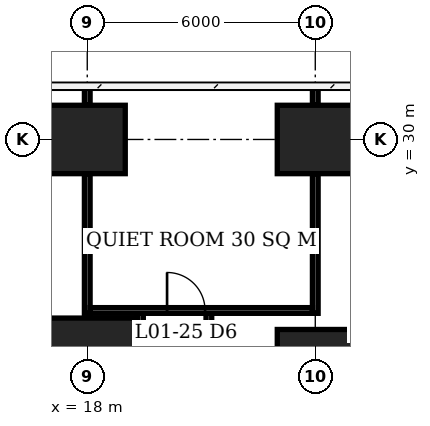
"""IFC4 building model, lengths in metres.
Left out: names, types, materials, properties, quantities, classifications, styles, units other than length and angle.
Written with IfcOpenShell. Run it as: python <this file> out.ifc"""

import sys

from ifc_helpers import new_model, si_unit, direction, frame, frame_2d, origin, origin_2d, place, context, subcontext, project, spatial, rectangle, extrude, element, fill, save


model = new_model("IFC4")
c1 = context("Model", 3, precision=1e-05, world=origin(), true_north=direction((0.0, 1.0)))
c2 = subcontext(c1, "Body", "Model", "MODEL_VIEW")
j1 = project(units=[si_unit("LENGTHUNIT", "METRE"), si_unit("PLANEANGLEUNIT", "RADIAN")], contexts=[c1])
p1 = place(None, origin())
s1 = spatial("IfcSite", under=j1, at=p1, CompositionType="ELEMENT")
p2 = place(p1, origin())
s2 = spatial("IfcBuilding", under=s1, at=p2, CompositionType="ELEMENT")
p3 = place(p2, frame((0.0, 0.0, 6.0)))
s3 = spatial("IfcBuildingStorey", under=s2, at=p3, CompositionType="ELEMENT", Elevation=6.0)
p4 = place(p3, frame((18.0, 24.0, 0.0), z_axis=(0.0, 0.0, 1.0), x_axis=(1.0, 0.0, 0.0)))
e1 = element("IfcColumn", 1, at=p4, inside=s3, PredefinedType="COLUMN", context=c2, shape_type="SweptSolid", body=[
    extrude(rectangle(XDim=2.6, YDim=2.6, at=origin_2d()), origin(), (0.0, 0.0, 1.0), 5.0),
])
p5 = place(p3, frame((18.0, 30.0, 0.0), z_axis=(0.0, 0.0, 1.0), x_axis=(1.0, 0.0, 0.0)))
e2 = element("IfcColumn", 2, at=p5, inside=s3, PredefinedType="COLUMN", context=c2, shape_type="SweptSolid", body=[
    extrude(rectangle(XDim=2.0, YDim=1.8, at=origin_2d()), origin(), (0.0, 0.0, 1.0), 5.0),
])
p6 = place(p3, frame((24.0, 24.0, 0.0), z_axis=(0.0, 0.0, 1.0), x_axis=(1.0, 0.0, 0.0)))
e3 = element("IfcColumn", 3, at=p6, inside=s3, PredefinedType="COLUMN", context=c2, shape_type="SweptSolid", body=[
    extrude(rectangle(XDim=2.0, YDim=2.0, at=origin_2d()), origin(), (0.0, 0.0, 1.0), 5.0),
])
p7 = place(p3, frame((24.0, 30.0, 0.0), z_axis=(0.0, 0.0, 1.0), x_axis=(1.0, 0.0, 0.0)))
e4 = element("IfcColumn", 4, at=p7, inside=s3, PredefinedType="COLUMN", context=c2, shape_type="SweptSolid", body=[
    extrude(rectangle(XDim=2.0, YDim=1.8, at=origin_2d()), origin(), (0.0, 0.0, 1.0), 5.0),
])
p8 = place(p3, frame((18.075, 25.5, 0.0), z_axis=(0.0, 0.0, 1.0), x_axis=(1.0, 0.0, 0.0)))
e5 = element("IfcWall", 5, at=p8, inside=s3, PredefinedType="PARTITIONING", context=c2, shape_type="SweptSolid", body=[
    extrude(rectangle(XDim=5.85, YDim=0.15, at=frame_2d((2.925, 0.0))), origin(), (0.0, 0.0, 1.0), 4.75),
])
p9 = place(p8, frame((2.025, 0.0, 0.0)))
e6 = element("IfcOpeningElement", 6, at=p9, cuts=e5, PredefinedType="OPENING", context=c2, shape_type="SweptSolid", body=[
    extrude(rectangle(XDim=1.0, YDim=2.1, at=frame_2d((0.5, 1.05))), frame((0.0, 0.085, 0.0), z_axis=(0.0, -1.0, 0.0), x_axis=(1.0, 0.0, 0.0)), (0.0, 0.0, 1.0), 0.17),
])
p10 = place(p3, frame((18.0, 25.425, 0.0), z_axis=(0.0, 0.0, 1.0), x_axis=(0.0, 1.0, 0.0)))
e7 = element("IfcWall", 7, at=p10, inside=s3, PredefinedType="PARTITIONING", context=c2, shape_type="SweptSolid", body=[
    extrude(rectangle(XDim=3.675, YDim=0.15, at=frame_2d((1.837, 0.0))), origin(), (0.0, 0.0, 1.0), 4.75),
])
p11 = place(p3, frame((18.0, 30.9, 0.0), z_axis=(0.0, 0.0, 1.0), x_axis=(0.0, 1.0, 0.0)))
e8 = element("IfcWall", 8, at=p11, inside=s3, PredefinedType="PARTITIONING", context=c2, shape_type="SweptSolid", body=[
    extrude(rectangle(XDim=0.475, YDim=0.15, at=frame_2d((0.238, 0.0))), origin(), (0.0, 0.0, 1.0), 4.75),
])
p12 = place(p3, frame((24.0, 25.425, 0.0), z_axis=(0.0, 0.0, 1.0), x_axis=(0.0, 1.0, 0.0)))
e9 = element("IfcWall", 9, at=p12, inside=s3, PredefinedType="PARTITIONING", context=c2, shape_type="SweptSolid", body=[
    extrude(rectangle(XDim=3.675, YDim=0.15, at=frame_2d((1.837, 0.0))), origin(), (0.0, 0.0, 1.0), 4.75),
])
p13 = place(p3, frame((24.0, 30.9, 0.0), z_axis=(0.0, 0.0, 1.0), x_axis=(0.0, 1.0, 0.0)))
e10 = element("IfcWall", 10, at=p13, inside=s3, PredefinedType="PARTITIONING", context=c2, shape_type="SweptSolid", body=[
    extrude(rectangle(XDim=0.475, YDim=0.15, at=frame_2d((0.238, 0.0))), origin(), (0.0, 0.0, 1.0), 4.75),
])
p14 = place(p3, frame((19.4, 16.0, 0.0), z_axis=(0.0, 0.0, 1.0), x_axis=(0.0, 1.0, 0.0)))
e11 = element("IfcWall", 11, at=p14, inside=s3, PredefinedType="PARTITIONING", context=c2, shape_type="SweptSolid", body=[
    extrude(rectangle(XDim=9.425, YDim=0.15, at=frame_2d((4.712, 0.0))), origin(), (0.0, 0.0, 1.0), 4.75),
])
p15 = place(p14, frame((3.05, 0.0, 0.0)))
e12 = element("IfcOpeningElement", 12, at=p15, cuts=e11, PredefinedType="OPENING", context=c2, shape_type="SweptSolid", body=[
    extrude(rectangle(XDim=1.0, YDim=2.1, at=frame_2d((0.5, 1.05))), frame((0.0, 0.085, 0.0), z_axis=(0.0, -1.0, 0.0), x_axis=(1.0, 0.0, 0.0)), (0.0, 0.0, 1.0), 0.17),
])
p16 = place(p3, frame((21.2, 19.575, 0.0), z_axis=(0.0, 0.0, 1.0), x_axis=(0.0, 1.0, 0.0)))
e13 = element("IfcWall", 13, at=p16, inside=s3, PredefinedType="PARTITIONING", context=c2, shape_type="SweptSolid", body=[
    extrude(rectangle(XDim=5.85, YDim=0.15, at=frame_2d((2.925, 0.0))), origin(), (0.0, 0.0, 1.0), 4.75),
])
p17 = place(p16, frame((3.276, 0.0, 0.0)))
e14 = element("IfcOpeningElement", 14, at=p17, cuts=e13, PredefinedType="OPENING", context=c2, shape_type="SweptSolid", body=[
    extrude(rectangle(XDim=1.0, YDim=2.1, at=frame_2d((0.5, 1.05))), frame((0.0, 0.085, 0.0), z_axis=(0.0, -1.0, 0.0), x_axis=(1.0, 0.0, 0.0)), (0.0, 0.0, 1.0), 0.17),
])
p18 = place(p9, origin())
e15 = element("IfcDoor", 15, at=p18, inside=s3, OperationType="SINGLE_SWING_LEFT", PredefinedType="DOOR", context=c2, shape_type="SweptSolid", body=[
    extrude(rectangle(XDim=1.0, YDim=2.1, at=frame_2d((0.5, 1.05))), frame((0.0, 0.025, 0.0), z_axis=(0.0, -1.0, 0.0), x_axis=(1.0, 0.0, 0.0)), (0.0, 0.0, 1.0), 0.05),
])
fill(e6, e15)
save(model, sys.argv[1])
